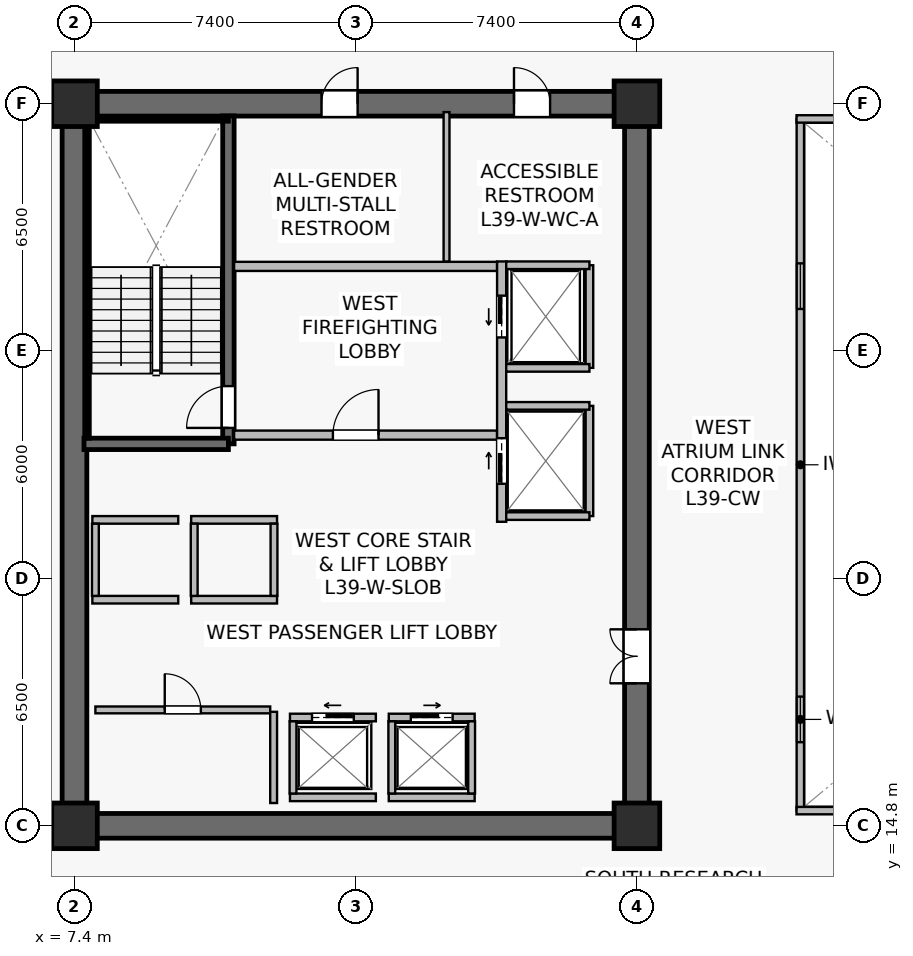
"""IFC4 building model, lengths in metres.
Left out: names, types, materials, properties, quantities, classifications, styles, units other than length and angle.
Written with IfcOpenShell. Run it as: python <this file> out.ifc"""

import sys

from ifc_helpers import new_model, si_unit, direction, frame, frame_2d, origin, origin_2d, place, context, subcontext, project, spatial, rectangle, extrude, source, transform, mapped, element, fill, save


model = new_model("IFC4")
c1 = context("Model", 3, precision=1e-05, world=origin(), true_north=direction((0.0, 1.0)))
c2 = subcontext(c1, "Body", "Model", "MODEL_VIEW")
j1 = project(units=[si_unit("LENGTHUNIT", "METRE"), si_unit("PLANEANGLEUNIT", "RADIAN")], contexts=[c1])
p1 = place(None, origin())
s1 = spatial("IfcSite", under=j1, at=p1, CompositionType="ELEMENT")
p2 = place(p1, origin())
s2 = spatial("IfcBuilding", under=s1, at=p2, CompositionType="ELEMENT")
p3 = place(p2, frame((0.0, 0.0, 162.5)))
s3 = spatial("IfcBuildingStorey", under=s2, at=p3, CompositionType="ELEMENT", Elevation=162.5)
p4 = place(p3, frame((7.075, 14.8, 0.0), z_axis=(0.0, 0.0, 1.0), x_axis=(1.0, 0.0, 0.0)))
e1 = element("IfcWall", 1, at=p4, inside=s3, PredefinedType="SHEAR", context=c2, shape_type="SweptSolid", body=[
    extrude(rectangle(XDim=15.45, YDim=0.65, at=frame_2d((7.725, 0.0))), origin(), (0.0, 0.0, 1.0), 3.79),
])
p5 = place(p3, frame((7.075, 33.8, 0.0), z_axis=(0.0, 0.0, 1.0), x_axis=(1.0, 0.0, 0.0)))
e2 = element("IfcWall", 2, at=p5, inside=s3, PredefinedType="SHEAR", context=c2, shape_type="SweptSolid", body=[
    extrude(rectangle(XDim=15.45, YDim=0.65, at=frame_2d((7.725, 0.0))), origin(), (0.0, 0.0, 1.0), 3.79),
])
p6 = place(p5, frame((6.825, 0.0, 0.0)))
e3 = element("IfcOpeningElement", 3, at=p6, cuts=e2, PredefinedType="OPENING", context=c2, shape_type="SweptSolid", body=[
    extrude(rectangle(XDim=0.95, YDim=2.15, at=frame_2d((0.475, 1.075))), frame((0.0, 0.335, 0.0), z_axis=(0.0, -1.0, 0.0), x_axis=(1.0, 0.0, 0.0)), (0.0, 0.0, 1.0), 0.67),
])
p7 = place(p5, frame((11.89, 0.0, 0.0)))
e4 = element("IfcOpeningElement", 4, at=p7, cuts=e2, PredefinedType="OPENING", context=c2, shape_type="SweptSolid", body=[
    extrude(rectangle(XDim=0.95, YDim=2.15, at=frame_2d((0.475, 1.075))), frame((0.0, 0.335, 0.0), z_axis=(0.0, -1.0, 0.0), x_axis=(1.0, 0.0, 0.0)), (0.0, 0.0, 1.0), 0.67),
])
p8 = place(p3, frame((7.4, 15.125, 0.0), z_axis=(0.0, 0.0, 1.0), x_axis=(0.0, 1.0, 0.0)))
e5 = element("IfcWall", 5, at=p8, inside=s3, PredefinedType="SHEAR", context=c2, shape_type="SweptSolid", body=[
    extrude(rectangle(XDim=18.35, YDim=0.65, at=frame_2d((9.175, 0.0))), origin(), (0.0, 0.0, 1.0), 3.79),
])
p9 = place(p3, frame((22.2, 15.125, 0.0), z_axis=(0.0, 0.0, 1.0), x_axis=(0.0, 1.0, 0.0)))
e6 = element("IfcWall", 6, at=p9, inside=s3, PredefinedType="SHEAR", context=c2, shape_type="SweptSolid", body=[
    extrude(rectangle(XDim=18.35, YDim=0.65, at=frame_2d((9.175, 0.0))), origin(), (0.0, 0.0, 1.0), 3.79),
])
p10 = place(p9, frame((3.425, 0.0, 0.0)))
e7 = element("IfcOpeningElement", 7, at=p10, cuts=e6, PredefinedType="OPENING", context=c2, shape_type="SweptSolid", body=[
    extrude(rectangle(XDim=1.42, YDim=2.2, at=frame_2d((0.71, 1.1))), frame((0.0, 0.335, 0.0), z_axis=(0.0, -1.0, 0.0), x_axis=(1.0, 0.0, 0.0)), (0.0, 0.0, 1.0), 0.67),
])
p11 = place(p3, frame((11.45, 24.85, 0.0), z_axis=(0.0, 0.0, 1.0), x_axis=(0.0, 1.0, 0.0)))
e8 = element("IfcWall", 8, at=p11, inside=s3, PredefinedType="SHEAR", context=c2, shape_type="SweptSolid", body=[
    extrude(rectangle(XDim=8.63, YDim=0.3, at=frame_2d((4.315, 0.0))), origin(), (0.0, 0.0, 1.0), 3.79),
])
p12 = place(p11, frame((0.42, 0.0, 0.0)))
e9 = element("IfcOpeningElement", 9, at=p12, cuts=e8, PredefinedType="OPENING", context=c2, shape_type="SweptSolid", body=[
    extrude(rectangle(XDim=1.1, YDim=2.15, at=frame_2d((0.55, 1.075))), frame((0.0, 0.16, 0.0), z_axis=(0.0, -1.0, 0.0), x_axis=(1.0, 0.0, 0.0)), (0.0, 0.0, 1.0), 0.32),
])
p13 = place(p3, frame((7.65, 24.85, 0.0), z_axis=(0.0, 0.0, 1.0), x_axis=(1.0, 0.0, 0.0)))
e10 = element("IfcWall", 10, at=p13, inside=s3, PredefinedType="SHEAR", context=c2, shape_type="SweptSolid", body=[
    extrude(rectangle(XDim=3.8, YDim=0.3, at=frame_2d((1.9, 0.0))), origin(), (0.0, 0.0, 1.0), 3.79),
])
p14 = place(p3, frame((7.73, 33.4, 0.0), z_axis=(0.0, 0.0, 1.0), x_axis=(1.0, 0.0, 0.0)))
e11 = element("IfcWall", 11, at=p14, inside=s3, PredefinedType="SOLIDWALL", context=c2, shape_type="SweptSolid", body=[
    extrude(rectangle(XDim=3.72, YDim=0.12, at=frame_2d((1.86, 0.0))), origin(), (0.0, 0.0, 1.0), 3.79),
])
p15 = place(p3, frame((7.73, 25.0, 0.0), z_axis=(0.0, 0.0, 1.0), x_axis=(0.0, 1.0, 0.0)))
e12 = element("IfcWall", 12, at=p15, inside=s3, PredefinedType="SOLIDWALL", context=c2, shape_type="SweptSolid", body=[
    extrude(rectangle(XDim=8.32, YDim=0.12, at=frame_2d((4.16, 0.0))), origin(), (0.0, 0.0, 1.0), 3.79),
])
m1 = source(origin(), c2, "Body", "SweptSolid", [
    extrude(rectangle(XDim=1.2, YDim=1.2, at=origin_2d()), origin(), (0.0, 0.0, 1.0), 4.1),
])
for number, where, z_axis, x_axis in (
    (13, (7.4, 14.8, 0.0), (0.0, 0.0, 1.0), (1.0, 0.0, 0.0)),
    (14, (22.2, 14.8, 0.0), (0.0, 0.0, 1.0), (1.0, 0.0, 0.0)),
    (15, (7.4, 33.8, 0.0), (0.0, 0.0, 1.0), (1.0, 0.0, 0.0)),
    (16, (22.2, 33.8, 0.0), (0.0, 0.0, 1.0), (1.0, 0.0, 0.0)),
):
    element("IfcColumn", number, at=place(p3, frame(where, z_axis=z_axis, x_axis=x_axis)), inside=s3, PredefinedType="COLUMN", context=c2, shape_type="MappedRepresentation", body=[
        mapped(m1, transform((0.0, 0.0, 0.0), scale=1.0)),
    ])
p16 = place(p3, frame((11.6, 25.08, 0.0), z_axis=(0.0, 0.0, 1.0), x_axis=(1.0, 0.0, 0.0)))
e17 = element("IfcWall", 17, at=p16, inside=s3, PredefinedType="SOLIDWALL", context=c2, shape_type="SweptSolid", body=[
    extrude(rectangle(XDim=6.92, YDim=0.24, at=frame_2d((3.46, 0.0))), origin(), (0.0, 0.0, 1.0), 3.187),
])
p17 = place(p16, frame((2.6, 0.0, 0.0)))
e18 = element("IfcOpeningElement", 18, at=p17, cuts=e17, PredefinedType="OPENING", context=c2, shape_type="SweptSolid", body=[
    extrude(rectangle(XDim=1.2, YDim=2.16, at=frame_2d((0.6, 1.08))), frame((0.0, 0.13, 0.0), z_axis=(0.0, -1.0, 0.0), x_axis=(1.0, 0.0, 0.0)), (0.0, 0.0, 1.0), 0.26),
])
p18 = place(p3, frame((11.6, 29.52, 0.0), z_axis=(0.0, 0.0, 1.0), x_axis=(1.0, 0.0, 0.0)))
e19 = element("IfcWall", 19, at=p18, inside=s3, PredefinedType="SOLIDWALL", context=c2, shape_type="SweptSolid", body=[
    extrude(rectangle(XDim=6.92, YDim=0.24, at=frame_2d((3.46, 0.0))), origin(), (0.0, 0.0, 1.0), 3.187),
])
p19 = place(p3, frame((18.64, 22.8, 0.0), z_axis=(0.0, 0.0, 1.0), x_axis=(0.0, 1.0, 0.0)))
e20 = element("IfcWall", 20, at=p19, inside=s3, PredefinedType="SOLIDWALL", context=c2, shape_type="SweptSolid", body=[
    extrude(rectangle(XDim=6.85, YDim=0.24, at=frame_2d((3.425, 0.0))), origin(), (0.0, 0.0, 1.0), 2.925),
])
p20 = place(p19, frame((4.85, 0.0, 0.0)))
e21 = element("IfcOpeningElement", 21, at=p20, cuts=e20, PredefinedType="OPENING", context=c2, shape_type="SweptSolid", body=[
    extrude(rectangle(XDim=1.1, YDim=2.22, at=frame_2d((0.55, 1.11))), frame((0.0, 0.13, 0.0), z_axis=(0.0, -1.0, 0.0), x_axis=(1.0, 0.0, 0.0)), (0.0, 0.0, 1.0), 0.26),
])
p21 = place(p19, frame((1.0, 0.0, 0.0)))
e22 = element("IfcOpeningElement", 22, at=p21, cuts=e20, PredefinedType="OPENING", context=c2, shape_type="SweptSolid", body=[
    extrude(rectangle(XDim=1.2, YDim=2.22, at=frame_2d((0.6, 1.11))), frame((0.0, 0.13, 0.0), z_axis=(0.0, -1.0, 0.0), x_axis=(1.0, 0.0, 0.0)), (0.0, 0.0, 1.0), 0.26),
])
p22 = place(p3, frame((13.07, 17.65, 0.0), z_axis=(0.0, 0.0, 1.0), x_axis=(1.0, 0.0, 0.0)))
e23 = element("IfcWall", 23, at=p22, inside=s3, PredefinedType="SOLIDWALL", context=c2, shape_type="SweptSolid", body=[
    extrude(rectangle(XDim=2.26, YDim=0.2, at=frame_2d((1.13, 0.0))), origin(), (0.0, 0.0, 1.0), 3.187),
])
p23 = place(p22, frame((0.58, 0.0, 0.0)))
e24 = element("IfcOpeningElement", 24, at=p23, cuts=e23, PredefinedType="OPENING", context=c2, shape_type="SweptSolid", body=[
    extrude(rectangle(XDim=1.1, YDim=2.22, at=frame_2d((0.55, 1.11))), frame((0.0, 0.11, 0.0), z_axis=(0.0, -1.0, 0.0), x_axis=(1.0, 0.0, 0.0)), (0.0, 0.0, 1.0), 0.22),
])
p24 = place(p3, frame((13.07, 15.55, 0.0), z_axis=(0.0, 0.0, 1.0), x_axis=(1.0, 0.0, 0.0)))
e25 = element("IfcWall", 25, at=p24, inside=s3, PredefinedType="SOLIDWALL", context=c2, shape_type="SweptSolid", body=[
    extrude(rectangle(XDim=2.26, YDim=0.2, at=frame_2d((1.13, 0.0))), origin(), (0.0, 0.0, 1.0), 3.187),
])
p25 = place(p3, frame((13.15, 15.65, 0.0), z_axis=(0.0, 0.0, 1.0), x_axis=(0.0, 1.0, 0.0)))
e26 = element("IfcWall", 26, at=p25, inside=s3, PredefinedType="SOLIDWALL", context=c2, shape_type="SweptSolid", body=[
    extrude(rectangle(XDim=1.9, YDim=0.18, at=frame_2d((0.95, 0.0))), origin(), (0.0, 0.0, 1.0), 3.79),
])
p26 = place(p3, frame((15.67, 17.65, 0.0), z_axis=(0.0, 0.0, 1.0), x_axis=(1.0, 0.0, 0.0)))
e27 = element("IfcWall", 27, at=p26, inside=s3, PredefinedType="SOLIDWALL", context=c2, shape_type="SweptSolid", body=[
    extrude(rectangle(XDim=2.26, YDim=0.2, at=frame_2d((1.13, 0.0))), origin(), (0.0, 0.0, 1.0), 3.79),
])
p27 = place(p26, frame((0.58, 0.0, 0.0)))
e28 = element("IfcOpeningElement", 28, at=p27, cuts=e27, PredefinedType="OPENING", context=c2, shape_type="SweptSolid", body=[
    extrude(rectangle(XDim=1.1, YDim=2.22, at=frame_2d((0.55, 1.11))), frame((0.0, 0.11, 0.0), z_axis=(0.0, -1.0, 0.0), x_axis=(1.0, 0.0, 0.0)), (0.0, 0.0, 1.0), 0.22),
])
p28 = place(p3, frame((15.67, 15.55, 0.0), z_axis=(0.0, 0.0, 1.0), x_axis=(1.0, 0.0, 0.0)))
e29 = element("IfcWall", 29, at=p28, inside=s3, PredefinedType="SOLIDWALL", context=c2, shape_type="SweptSolid", body=[
    extrude(rectangle(XDim=2.26, YDim=0.2, at=frame_2d((1.13, 0.0))), origin(), (0.0, 0.0, 1.0), 3.79),
])
for number, where, z_axis, x_axis in (
    (30, (15.75, 15.65, 0.0), (0.0, 0.0, 1.0), (0.0, 1.0, 0.0)),
    (31, (17.85, 15.65, 0.0), (0.0, 0.0, 1.0), (0.0, 1.0, 0.0)),
):
    element("IfcWall", number, at=place(p3, frame(where, z_axis=z_axis, x_axis=x_axis)), inside=s3, PredefinedType="SOLIDWALL", context=c2, shape_type="SweptSolid", body=[
        extrude(rectangle(XDim=1.9, YDim=0.18, at=frame_2d((0.95, 0.0))), origin(), (0.0, 0.0, 1.0), 3.79),
    ])
for number, where, z_axis, x_axis in (
    (32, (7.87, 20.75, 0.0), (0.0, 0.0, 1.0), (1.0, 0.0, 0.0)),
    (33, (7.87, 22.85, 0.0), (0.0, 0.0, 1.0), (1.0, 0.0, 0.0)),
):
    element("IfcWall", number, at=place(p3, frame(where, z_axis=z_axis, x_axis=x_axis)), inside=s3, PredefinedType="SOLIDWALL", context=c2, shape_type="SweptSolid", body=[
        extrude(rectangle(XDim=2.26, YDim=0.2, at=frame_2d((1.13, 0.0))), origin(), (0.0, 0.0, 1.0), 3.79),
    ])
p29 = place(p3, frame((7.95, 20.85, 0.0), z_axis=(0.0, 0.0, 1.0), x_axis=(0.0, 1.0, 0.0)))
e34 = element("IfcWall", 34, at=p29, inside=s3, PredefinedType="SOLIDWALL", context=c2, shape_type="SweptSolid", body=[
    extrude(rectangle(XDim=1.9, YDim=0.18, at=frame_2d((0.95, 0.0))), origin(), (0.0, 0.0, 1.0), 3.79),
])
for number, where, z_axis, x_axis in (
    (35, (10.47, 20.75, 0.0), (0.0, 0.0, 1.0), (1.0, 0.0, 0.0)),
    (36, (10.47, 22.85, 0.0), (0.0, 0.0, 1.0), (1.0, 0.0, 0.0)),
):
    element("IfcWall", number, at=place(p3, frame(where, z_axis=z_axis, x_axis=x_axis)), inside=s3, PredefinedType="SOLIDWALL", context=c2, shape_type="SweptSolid", body=[
        extrude(rectangle(XDim=2.26, YDim=0.2, at=frame_2d((1.13, 0.0))), origin(), (0.0, 0.0, 1.0), 3.79),
    ])
for number, where, z_axis, x_axis in (
    (37, (10.55, 20.85, 0.0), (0.0, 0.0, 1.0), (0.0, 1.0, 0.0)),
    (38, (12.65, 20.85, 0.0), (0.0, 0.0, 1.0), (0.0, 1.0, 0.0)),
):
    element("IfcWall", number, at=place(p3, frame(where, z_axis=z_axis, x_axis=x_axis)), inside=s3, PredefinedType="SOLIDWALL", context=c2, shape_type="SweptSolid", body=[
        extrude(rectangle(XDim=1.9, YDim=0.18, at=frame_2d((0.95, 0.0))), origin(), (0.0, 0.0, 1.0), 3.79),
    ])
p30 = place(p3, frame((20.95, 26.85, 0.0), z_axis=(0.0, 0.0, 1.0), x_axis=(0.0, 1.0, 0.0)))
e39 = element("IfcWall", 39, at=p30, inside=s3, PredefinedType="SOLIDWALL", context=c2, shape_type="SweptSolid", body=[
    extrude(rectangle(XDim=2.7, YDim=0.2, at=frame_2d((1.35, 0.0))), origin(), (0.0, 0.0, 1.0), 3.79),
])
p31 = place(p3, frame((18.76, 29.55, 0.0), z_axis=(0.0, 0.0, 1.0), x_axis=(1.0, 0.0, 0.0)))
e40 = element("IfcWall", 40, at=p31, inside=s3, PredefinedType="SOLIDWALL", context=c2, shape_type="SweptSolid", body=[
    extrude(rectangle(XDim=2.19, YDim=0.2, at=frame_2d((1.095, 0.0))), origin(), (0.0, 0.0, 1.0), 3.79),
])
p32 = place(p3, frame((18.76, 26.85, 0.0), z_axis=(0.0, 0.0, 1.0), x_axis=(1.0, 0.0, 0.0)))
e41 = element("IfcWall", 41, at=p32, inside=s3, PredefinedType="SOLIDWALL", context=c2, shape_type="SweptSolid", body=[
    extrude(rectangle(XDim=2.19, YDim=0.2, at=frame_2d((1.095, 0.0))), origin(), (0.0, 0.0, 1.0), 3.187),
])
p33 = place(p3, frame((20.95, 22.95, 0.0), z_axis=(0.0, 0.0, 1.0), x_axis=(0.0, 1.0, 0.0)))
e42 = element("IfcWall", 42, at=p33, inside=s3, PredefinedType="SOLIDWALL", context=c2, shape_type="SweptSolid", body=[
    extrude(rectangle(XDim=2.9, YDim=0.2, at=frame_2d((1.45, 0.0))), origin(), (0.0, 0.0, 1.0), 2.925),
])
for number, where, z_axis, x_axis in (
    (43, (18.76, 25.85, 0.0), (0.0, 0.0, 1.0), (1.0, 0.0, 0.0)),
    (44, (18.76, 22.95, 0.0), (0.0, 0.0, 1.0), (1.0, 0.0, 0.0)),
):
    element("IfcWall", number, at=place(p3, frame(where, z_axis=z_axis, x_axis=x_axis)), inside=s3, PredefinedType="SOLIDWALL", context=c2, shape_type="SweptSolid", body=[
        extrude(rectangle(XDim=2.19, YDim=0.2, at=frame_2d((1.095, 0.0))), origin(), (0.0, 0.0, 1.0), 3.79),
    ])
p34 = place(p3, frame((7.95, 17.85, 0.0), z_axis=(0.0, 0.0, 1.0), x_axis=(1.0, 0.0, 0.0)))
e45 = element("IfcWall", 45, at=p34, inside=s3, PredefinedType="SOLIDWALL", context=c2, shape_type="SweptSolid", body=[
    extrude(rectangle(XDim=4.6, YDim=0.18, at=frame_2d((2.3, 0.0))), origin(), (0.0, 0.0, 1.0), 3.79),
])
p35 = place(p34, frame((1.825, 0.0, 0.0)))
e46 = element("IfcOpeningElement", 46, at=p35, cuts=e45, PredefinedType="OPENING", context=c2, shape_type="SweptSolid", body=[
    extrude(rectangle(XDim=0.95, YDim=2.15, at=frame_2d((0.475, 1.075))), frame((0.0, 0.1, 0.0), z_axis=(0.0, -1.0, 0.0), x_axis=(1.0, 0.0, 0.0)), (0.0, 0.0, 1.0), 0.2),
])
p36 = place(p3, frame((12.64, 15.4, 0.0), z_axis=(0.0, 0.0, 1.0), x_axis=(0.0, 1.0, 0.0)))
e47 = element("IfcWall", 47, at=p36, inside=s3, PredefinedType="SOLIDWALL", context=c2, shape_type="SweptSolid", body=[
    extrude(rectangle(XDim=2.4, YDim=0.18, at=frame_2d((1.2, 0.0))), origin(), (0.0, 0.0, 1.0), 3.79),
])
p37 = place(p3, frame((17.19, 29.65, 0.0), z_axis=(0.0, 0.0, 1.0), x_axis=(0.0, 1.0, 0.0)))
e48 = element("IfcWall", 48, at=p37, inside=s3, PredefinedType="PLUMBINGWALL", context=c2, shape_type="SweptSolid", body=[
    extrude(rectangle(XDim=3.93, YDim=0.155, at=frame_2d((1.965, 0.0))), origin(), (0.0, 0.0, 1.0), 3.79),
])
p38 = place(p3, frame((26.5, 15.2, 0.0), z_axis=(0.0, 0.0, 1.0), x_axis=(0.0, 1.0, 0.0)))
e49 = element("IfcWall", 49, at=p38, inside=s3, PredefinedType="SOLIDWALL", context=c2, shape_type="SweptSolid", body=[
    extrude(rectangle(XDim=18.2, YDim=0.195, at=frame_2d((9.1, 0.0))), origin(), (0.0, 0.0, 1.0), 3.79),
])
p39 = place(p38, frame((1.8, 0.0, 0.9)))
e50 = element("IfcOpeningElement", 50, at=p39, cuts=e49, PredefinedType="OPENING", context=c2, shape_type="SweptSolid", body=[
    extrude(rectangle(XDim=1.2, YDim=1.35, at=frame_2d((0.6, 0.675))), frame((0.0, 0.107, 0.0), z_axis=(0.0, -1.0, 0.0), x_axis=(1.0, 0.0, 0.0)), (0.0, 0.0, 1.0), 0.215),
])
p40 = place(p38, frame((13.2, 0.0, 0.9)))
e51 = element("IfcOpeningElement", 51, at=p40, cuts=e49, PredefinedType="OPENING", context=c2, shape_type="SweptSolid", body=[
    extrude(rectangle(XDim=1.2, YDim=1.35, at=frame_2d((0.6, 0.675))), frame((0.0, 0.107, 0.0), z_axis=(0.0, -1.0, 0.0), x_axis=(1.0, 0.0, 0.0)), (0.0, 0.0, 1.0), 0.215),
])
for number, where, z_axis, x_axis in (
    (52, (26.4, 15.2, 0.0), (0.0, 0.0, 1.0), (1.0, 0.0, 0.0)),
    (53, (26.4, 33.4, 0.0), (0.0, 0.0, 1.0), (1.0, 0.0, 0.0)),
):
    element("IfcWall", number, at=place(p3, frame(where, z_axis=z_axis, x_axis=x_axis)), inside=s3, PredefinedType="SOLIDWALL", context=c2, shape_type="SweptSolid", body=[
        extrude(rectangle(XDim=22.0, YDim=0.195, at=frame_2d((11.0, 0.0))), origin(), (0.0, 0.0, 1.0), 3.79),
    ])
m2 = source(origin(), c2, "Body", "SweptSolid", [
    extrude(rectangle(XDim=1.2, YDim=1.35, at=frame_2d((0.6, 0.675))), frame((0.0, 0.03, 0.0), z_axis=(0.0, -1.0, 0.0), x_axis=(1.0, 0.0, 0.0)), (0.0, 0.0, 1.0), 0.06),
])
p41 = place(p39, origin())
e54 = element("IfcWindow", 54, at=p41, inside=s3, PartitioningType="SINGLE_PANEL", PredefinedType="WINDOW", context=c2, shape_type="MappedRepresentation", body=[
    mapped(m2, transform((0.0, 0.0, 0.0), scale=1.0)),
])
fill(e50, e54)
p42 = place(p40, origin())
e55 = element("IfcWindow", 55, at=p42, inside=s3, PartitioningType="SINGLE_PANEL", PredefinedType="WINDOW", context=c2, shape_type="MappedRepresentation", body=[
    mapped(m2, transform((0.0, 0.0, 0.0), scale=1.0)),
])
fill(e51, e55)
m3 = source(origin(), c2, "Body", "SweptSolid", [
    extrude(rectangle(XDim=1.1, YDim=2.15, at=frame_2d((0.55, 1.075))), frame((0.0, 0.025, 0.0), z_axis=(0.0, -1.0, 0.0), x_axis=(1.0, 0.0, 0.0)), (0.0, 0.0, 1.0), 0.05),
])
p43 = place(p12, origin())
e56 = element("IfcDoor", 56, at=p43, inside=s3, OperationType="SINGLE_SWING_LEFT", PredefinedType="DOOR", context=c2, shape_type="MappedRepresentation", body=[
    mapped(m3, transform((0.0, 0.0, 0.0), scale=1.0)),
])
fill(e9, e56)
m4 = source(origin(), c2, "Body", "SweptSolid", [
    extrude(rectangle(XDim=1.2, YDim=2.16, at=frame_2d((0.6, 1.08))), frame((0.0, 0.025, 0.0), z_axis=(0.0, -1.0, 0.0), x_axis=(1.0, 0.0, 0.0)), (0.0, 0.0, 1.0), 0.05),
])
p44 = place(p17, origin())
e57 = element("IfcDoor", 57, at=p44, inside=s3, OperationType="SINGLE_SWING_RIGHT", PredefinedType="DOOR", context=c2, shape_type="MappedRepresentation", body=[
    mapped(m4, transform((0.0, 0.0, 0.0), scale=1.0)),
])
fill(e18, e57)
m5 = source(origin(), c2, "Body", "SweptSolid", [
    extrude(rectangle(XDim=1.1, YDim=2.22, at=frame_2d((0.55, 1.11))), frame((0.0, 0.025, 0.0), z_axis=(0.0, -1.0, 0.0), x_axis=(1.0, 0.0, 0.0)), (0.0, 0.0, 1.0), 0.05),
])
p45 = place(p23, origin())
e58 = element("IfcDoor", 58, at=p45, inside=s3, OperationType="SLIDING_TO_LEFT", PredefinedType="USERDEFINED", context=c2, shape_type="MappedRepresentation", body=[
    mapped(m5, transform((0.0, 0.0, 0.0), scale=1.0)),
])
fill(e24, e58)
p46 = place(p27, origin())
e59 = element("IfcDoor", 59, at=p46, inside=s3, OperationType="SLIDING_TO_RIGHT", PredefinedType="USERDEFINED", context=c2, shape_type="MappedRepresentation", body=[
    mapped(m5, transform((0.0, 0.0, 0.0), scale=1.0)),
])
fill(e28, e59)
p47 = place(p20, origin())
e60 = element("IfcDoor", 60, at=p47, inside=s3, OperationType="SLIDING_TO_LEFT", PredefinedType="USERDEFINED", context=c2, shape_type="MappedRepresentation", body=[
    mapped(m5, transform((0.0, 0.0, 0.0), scale=1.0)),
])
fill(e21, e60)
m6 = source(origin(), c2, "Body", "SweptSolid", [
    extrude(rectangle(XDim=1.2, YDim=2.22, at=frame_2d((0.6, 1.11))), frame((0.0, 0.025, 0.0), z_axis=(0.0, -1.0, 0.0), x_axis=(1.0, 0.0, 0.0)), (0.0, 0.0, 1.0), 0.05),
])
p48 = place(p21, origin())
e61 = element("IfcDoor", 61, at=p48, inside=s3, OperationType="SLIDING_TO_RIGHT", PredefinedType="USERDEFINED", context=c2, shape_type="MappedRepresentation", body=[
    mapped(m6, transform((0.0, 0.0, 0.0), scale=1.0)),
])
fill(e22, e61)
m7 = source(origin(), c2, "Body", "SweptSolid", [
    extrude(rectangle(XDim=0.95, YDim=2.15, at=frame_2d((0.475, 1.075))), frame((0.0, 0.025, 0.0), z_axis=(0.0, -1.0, 0.0), x_axis=(1.0, 0.0, 0.0)), (0.0, 0.0, 1.0), 0.05),
])
p49 = place(p35, origin())
e62 = element("IfcDoor", 62, at=p49, inside=s3, OperationType="SINGLE_SWING_LEFT", PredefinedType="DOOR", context=c2, shape_type="MappedRepresentation", body=[
    mapped(m7, transform((0.0, 0.0, 0.0), scale=1.0)),
])
fill(e46, e62)
m8 = source(origin(), c2, "Body", "SweptSolid", [
    extrude(rectangle(XDim=1.42, YDim=2.2, at=frame_2d((0.71, 1.1))), frame((0.0, 0.025, 0.0), z_axis=(0.0, -1.0, 0.0), x_axis=(1.0, 0.0, 0.0)), (0.0, 0.0, 1.0), 0.05),
])
p50 = place(p10, origin())
e63 = element("IfcDoor", 63, at=p50, inside=s3, OperationType="DOUBLE_DOOR_SINGLE_SWING", PredefinedType="DOOR", context=c2, shape_type="MappedRepresentation", body=[
    mapped(m8, transform((0.0, 0.0, 0.0), scale=1.0)),
])
fill(e7, e63)
p51 = place(p6, origin())
e64 = element("IfcDoor", 64, at=p51, inside=s3, OperationType="SINGLE_SWING_RIGHT", PredefinedType="DOOR", context=c2, shape_type="MappedRepresentation", body=[
    mapped(m7, transform((0.0, 0.0, 0.0), scale=1.0)),
])
fill(e3, e64)
p52 = place(p7, origin())
e65 = element("IfcDoor", 65, at=p52, inside=s3, OperationType="SINGLE_SWING_LEFT", PredefinedType="DOOR", context=c2, shape_type="MappedRepresentation", body=[
    mapped(m7, transform((0.0, 0.0, 0.0), scale=1.0)),
])
fill(e4, e65)
save(model, sys.argv[1])
